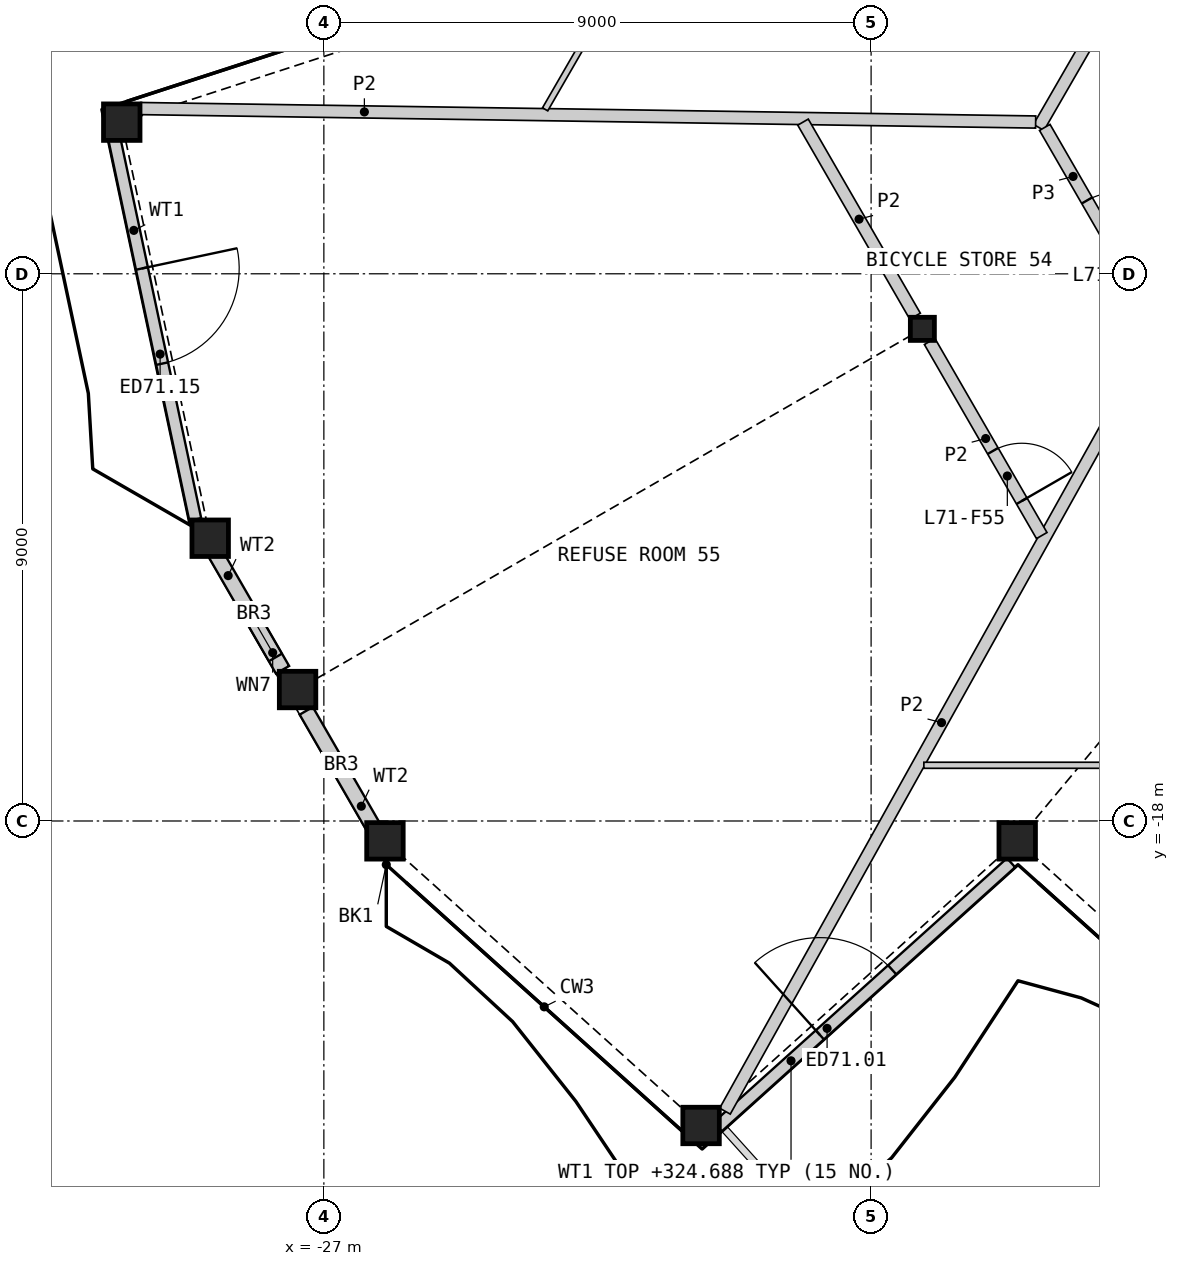
"""IFC4 building model, lengths in metres.
Left out: names, types, materials, properties, quantities, classifications, styles, units other than length and angle.
Written with IfcOpenShell. Run it as: python <this file> out.ifc"""

import sys

from ifc_helpers import new_model, si_unit, direction, frame, frame_2d, origin, origin_2d, place, context, subcontext, project, spatial, rectangle, hollow_rectangle, i_section, extrude, element, fill, save


model = new_model("IFC4")
c1 = context("Model", 3, precision=1e-05, world=origin(), true_north=direction((0.0, 1.0)))
c2 = subcontext(c1, "Body", "Model", "MODEL_VIEW")
j1 = project(units=[si_unit("LENGTHUNIT", "METRE"), si_unit("PLANEANGLEUNIT", "RADIAN")], contexts=[c1])
p1 = place(None, origin())
s1 = spatial("IfcSite", under=j1, at=p1, CompositionType="ELEMENT")
p2 = place(p1, origin())
s2 = spatial("IfcBuilding", under=s1, at=p2, CompositionType="ELEMENT")
p3 = place(p2, frame((0.0, 0.0, 322.2)))
s3 = spatial("IfcBuildingStorey", under=s2, at=p3, CompositionType="ELEMENT", Elevation=322.2)
for number, where, z_axis, x_axis in (
    (1, (-25.995, -18.327, 0.0), (0.0, 0.0, 1.0), (1.0, 0.0, 0.0)),
    (2, (-20.796, -23.008, 0.0), (0.0, 0.0, 1.0), (1.0, 0.0, 0.0)),
    (3, (-15.597, -18.327, 0.0), (0.0, 0.0, 1.0), (1.0, 0.0, 0.0)),
    (4, (-30.324, -6.506, 0.0), (0.0, 0.0, 1.0), (1.0, 0.0, 0.0)),
    (5, (-28.869, -13.349, 0.0), (0.0, 0.0, 1.0), (1.0, 0.0, 0.0)),
    (6, (-27.432, -15.838, 0.0), (0.0, 0.0, 1.0), (1.0, 0.0, 0.0)),
):
    element("IfcColumn", number, at=place(p3, frame(where, z_axis=z_axis, x_axis=x_axis)), inside=s3, PredefinedType="COLUMN", context=c2, shape_type="SweptSolid", body=[
        extrude(hollow_rectangle(XDim=0.6, YDim=0.6, WallThickness=0.04, at=origin_2d()), origin(), (0.0, 0.0, 1.0), 3.4),
    ])
p4 = place(p3, frame((-17.157, -9.906, 0.0), z_axis=(0.0, 0.0, 1.0), x_axis=(1.0, 0.0, 0.0)))
e7 = element("IfcColumn", 7, at=p4, inside=s3, PredefinedType="COLUMN", context=c2, shape_type="SweptSolid", body=[
    extrude(i_section(OverallWidth=0.396, OverallDepth=0.381, WebThickness=0.019, FlangeThickness=0.03, at=origin_2d()), origin(), (0.0, 0.0, 1.0), 3.4),
])
p5 = place(p3, frame((-20.523, -23.031, 0.0), z_axis=(0.0, 0.0, 1.0), x_axis=(0.743138937876, 0.669137145145, 0.0)))
e8 = element("IfcWall", 8, at=p5, inside=s3, PredefinedType="SOLIDWALL", context=c2, shape_type="SweptSolid", body=[
    extrude(rectangle(XDim=6.493, YDim=0.2, at=frame_2d((3.246, 0.0))), origin(), (0.0, 0.0, 1.0), 2.488),
])
p6 = place(p5, frame((2.261, 0.0, 0.0)))
e9 = element("IfcOpeningElement", 9, at=p6, cuts=e8, PredefinedType="OPENING", context=c2, shape_type="SweptSolid", body=[
    extrude(rectangle(XDim=1.6, YDim=2.25, at=frame_2d((0.8, 1.125))), frame((0.0, 0.11, 0.0), z_axis=(0.0, -1.0, 0.0), x_axis=(1.0, 0.0, 0.0)), (0.0, 0.0, 1.0), 0.22),
])
p7 = place(p3, frame((-30.462, -6.701, 0.0), z_axis=(0.0, 0.0, 1.0), x_axis=(0.207915966693, -0.978146691859, 0.0)))
e10 = element("IfcWall", 10, at=p7, inside=s3, PredefinedType="SOLIDWALL", context=c2, shape_type="SweptSolid", body=[
    extrude(rectangle(XDim=6.482, YDim=0.2, at=frame_2d((3.241, 0.0))), origin(), (0.0, 0.0, 1.0), 2.488),
])
p8 = place(p7, frame((2.261, 0.0, 0.0)))
e11 = element("IfcOpeningElement", 11, at=p8, cuts=e10, PredefinedType="OPENING", context=c2, shape_type="SweptSolid", body=[
    extrude(rectangle(XDim=1.6, YDim=2.25, at=frame_2d((0.8, 1.125))), frame((0.0, 0.11, 0.0), z_axis=(0.0, -1.0, 0.0), x_axis=(1.0, 0.0, 0.0)), (0.0, 0.0, 1.0), 0.22),
])
p9 = place(p3, frame((-28.872, -13.448, 0.0), z_axis=(0.0, 0.0, 1.0), x_axis=(0.499982446489, -0.866035538072, 0.0)))
e12 = element("IfcWall", 12, at=p9, inside=s3, PredefinedType="SOLIDWALL", context=c2, shape_type="SweptSolid", body=[
    extrude(rectangle(XDim=2.384, YDim=0.25, at=frame_2d((1.192, 0.0))), origin(), (0.0, 0.0, 1.0), 2.488),
])
p10 = place(p9, frame((1.25, 0.0, 1.6)))
e13 = element("IfcOpeningElement", 13, at=p10, cuts=e12, PredefinedType="OPENING", context=c2, shape_type="SweptSolid", body=[
    extrude(rectangle(XDim=0.9, YDim=0.6, at=frame_2d((0.45, 0.3))), frame((0.0, 0.135, 0.0), z_axis=(0.0, -1.0, 0.0), x_axis=(1.0, 0.0, 0.0)), (0.0, 0.0, 1.0), 0.27),
])
p11 = place(p3, frame((-27.29, -16.188, 0.0), z_axis=(0.0, 0.0, 1.0), x_axis=(0.50001992892, -0.866013897511, 0.0)))
e14 = element("IfcWall", 14, at=p11, inside=s3, PredefinedType="SOLIDWALL", context=c2, shape_type="SweptSolid", body=[
    extrude(rectangle(XDim=2.416, YDim=0.25, at=frame_2d((1.208, 0.0))), origin(), (0.0, 0.0, 1.0), 2.488),
])
p12 = place(p3, frame((-15.244, -6.592, 0.0), z_axis=(0.0, 0.0, 1.0), x_axis=(0.49999094734, 0.866030630277, 0.0)))
e15 = element("IfcWall", 15, at=p12, inside=s3, PredefinedType="PARTITIONING", context=c2, shape_type="SweptSolid", body=[
    extrude(rectangle(XDim=4.513, YDim=0.2, at=frame_2d((2.256, 0.0))), origin(), (0.0, 0.0, 1.0), 3.1),
])
p13 = place(p3, frame((-15.144, -6.592, 0.0), z_axis=(0.0, 0.0, 1.0), x_axis=(0.499958791762, -0.866049194065, 0.0)))
e16 = element("IfcWall", 16, at=p13, inside=s3, PredefinedType="PARTITIONING", context=c2, shape_type="SweptSolid", body=[
    extrude(rectangle(XDim=3.726, YDim=0.2, at=frame_2d((1.863, 0.0))), origin(), (0.0, 0.0, 1.0), 3.1),
])
p14 = place(p13, frame((1.388, 0.0, 0.0)))
e17 = element("IfcOpeningElement", 17, at=p14, cuts=e16, PredefinedType="OPENING", context=c2, shape_type="SweptSolid", body=[
    extrude(rectangle(XDim=0.95, YDim=2.1, at=frame_2d((0.475, 1.05))), frame((0.0, 0.11, 0.0), z_axis=(0.0, -1.0, 0.0), x_axis=(1.0, 0.0, 0.0)), (0.0, 0.0, 1.0), 0.22),
])
p15 = place(p3, frame((-20.404, -22.772, 0.0), z_axis=(0.0, 0.0, 1.0), x_axis=(0.486917529285, 0.873447949036, 0.0)))
e18 = element("IfcWall", 18, at=p15, inside=s3, PredefinedType="PARTITIONING", context=c2, shape_type="SweptSolid", body=[
    extrude(rectangle(XDim=14.631, YDim=0.2, at=frame_2d((7.315, 0.0))), origin(), (0.0, 0.0, 1.0), 2.33),
])
p16 = place(p3, frame((-30.014, -6.282, 0.0), z_axis=(0.0, 0.0, 1.0), x_axis=(0.99988686643, -0.015041753265, 0.0)))
e19 = element("IfcWall", 19, at=p16, inside=s3, PredefinedType="PARTITIONING", context=c2, shape_type="SweptSolid", body=[
    extrude(rectangle(XDim=14.721, YDim=0.2, at=frame_2d((7.361, 0.0))), origin(), (0.0, 0.0, 1.0), 2.33),
])
p17 = place(p3, frame((-17.037, -10.113, 0.0), z_axis=(0.0, 0.0, 1.0), x_axis=(0.50002820729, -0.866009117685, 0.0)))
e20 = element("IfcWall", 20, at=p17, inside=s3, PredefinedType="PARTITIONING", context=c2, shape_type="SweptSolid", body=[
    extrude(rectangle(XDim=3.686, YDim=0.2, at=frame_2d((1.843, 0.0))), origin(), (0.0, 0.0, 1.0), 2.33),
])
p18 = place(p17, frame((2.08, 0.0, 0.0)))
e21 = element("IfcOpeningElement", 21, at=p18, cuts=e20, PredefinedType="OPENING", context=c2, shape_type="SweptSolid", body=[
    extrude(rectangle(XDim=0.95, YDim=2.1, at=frame_2d((0.475, 1.05))), frame((0.0, 0.11, 0.0), z_axis=(0.0, -1.0, 0.0), x_axis=(1.0, 0.0, 0.0)), (0.0, 0.0, 1.0), 0.22),
])
p19 = place(p3, frame((-19.12, -6.506, 0.0), z_axis=(0.0, 0.0, 1.0), x_axis=(0.499978535015, -0.866037796245, 0.0)))
e22 = element("IfcWall", 22, at=p19, inside=s3, PredefinedType="PARTITIONING", context=c2, shape_type="SweptSolid", body=[
    extrude(rectangle(XDim=3.686, YDim=0.2, at=frame_2d((1.843, 0.0))), origin(), (0.0, 0.0, 1.0), 2.33),
])
p20 = place(p3, frame((-23.361, -6.295, 0.0), z_axis=(0.0, 0.0, 1.0), x_axis=(0.499987686533, 0.866032512851, 0.0)))
e23 = element("IfcWall", 23, at=p20, inside=s3, PredefinedType="PARTITIONING", context=c2, shape_type="SweptSolid", body=[
    extrude(rectangle(XDim=6.693, YDim=0.1, at=frame_2d((3.347, 0.0))), origin(), (0.0, 0.0, 1.0), 2.33),
])
p21 = place(p20, frame((3.275, 0.0, 0.0)))
e24 = element("IfcOpeningElement", 24, at=p21, cuts=e23, PredefinedType="OPENING", context=c2, shape_type="SweptSolid", body=[
    extrude(rectangle(XDim=0.95, YDim=2.1, at=frame_2d((0.475, 1.05))), frame((0.0, 0.06, 0.0), z_axis=(0.0, -1.0, 0.0), x_axis=(1.0, 0.0, 0.0)), (0.0, 0.0, 1.0), 0.12),
])
p22 = place(p3, frame((-17.132, -17.084, 0.0), z_axis=(0.0, 0.0, 1.0), x_axis=(1.0, 0.0, 0.0)))
e25 = element("IfcWall", 25, at=p22, inside=s3, PredefinedType="PARTITIONING", context=c2, shape_type="SweptSolid", body=[
    extrude(rectangle(XDim=6.693, YDim=0.1, at=frame_2d((3.346, 0.0))), origin(), (0.0, 0.0, 1.0), 2.33),
])
p23 = place(p22, frame((4.989, 0.0, 0.0)))
e26 = element("IfcOpeningElement", 26, at=p23, cuts=e25, PredefinedType="OPENING", context=c2, shape_type="SweptSolid", body=[
    extrude(rectangle(XDim=0.95, YDim=2.1, at=frame_2d((0.475, 1.05))), frame((0.0, 0.06, 0.0), z_axis=(0.0, -1.0, 0.0), x_axis=(1.0, 0.0, 0.0)), (0.0, 0.0, 1.0), 0.12),
])
p24 = place(p6, origin())
e27 = element("IfcDoor", 27, at=p24, inside=s3, OperationType="DOUBLE_DOOR_SINGLE_SWING", PredefinedType="DOOR", context=c2, shape_type="SweptSolid", body=[
    extrude(rectangle(XDim=1.6, YDim=2.25, at=frame_2d((0.8, 1.125))), frame((0.0, 0.025, 0.0), z_axis=(0.0, -1.0, 0.0), x_axis=(1.0, 0.0, 0.0)), (0.0, 0.0, 1.0), 0.05),
])
fill(e9, e27)
p25 = place(p8, origin())
e28 = element("IfcDoor", 28, at=p25, inside=s3, OperationType="DOUBLE_DOOR_SINGLE_SWING", PredefinedType="DOOR", context=c2, shape_type="SweptSolid", body=[
    extrude(rectangle(XDim=1.6, YDim=2.25, at=frame_2d((0.8, 1.125))), frame((0.0, 0.025, 0.0), z_axis=(0.0, -1.0, 0.0), x_axis=(1.0, 0.0, 0.0)), (0.0, 0.0, 1.0), 0.05),
])
fill(e11, e28)
p26 = place(p10, origin())
e29 = element("IfcWindow", 29, at=p26, inside=s3, PartitioningType="SINGLE_PANEL", PredefinedType="WINDOW", context=c2, shape_type="SweptSolid", body=[
    extrude(rectangle(XDim=0.9, YDim=0.6, at=frame_2d((0.45, 0.3))), frame((0.0, 0.03, 0.0), z_axis=(0.0, -1.0, 0.0), x_axis=(1.0, 0.0, 0.0)), (0.0, 0.0, 1.0), 0.06),
])
fill(e13, e29)
p27 = place(p14, origin())
e30 = element("IfcDoor", 30, at=p27, inside=s3, OperationType="SINGLE_SWING_RIGHT", PredefinedType="DOOR", context=c2, shape_type="SweptSolid", body=[
    extrude(rectangle(XDim=0.95, YDim=2.1, at=frame_2d((0.475, 1.05))), frame((0.0, 0.025, 0.0), z_axis=(0.0, -1.0, 0.0), x_axis=(1.0, 0.0, 0.0)), (0.0, 0.0, 1.0), 0.05),
])
fill(e17, e30)
p28 = place(p18, origin())
e31 = element("IfcDoor", 31, at=p28, inside=s3, OperationType="SINGLE_SWING_RIGHT", PredefinedType="DOOR", context=c2, shape_type="SweptSolid", body=[
    extrude(rectangle(XDim=0.95, YDim=2.1, at=frame_2d((0.475, 1.05))), frame((0.0, 0.025, 0.0), z_axis=(0.0, -1.0, 0.0), x_axis=(1.0, 0.0, 0.0)), (0.0, 0.0, 1.0), 0.05),
])
fill(e21, e31)
save(model, sys.argv[1])
